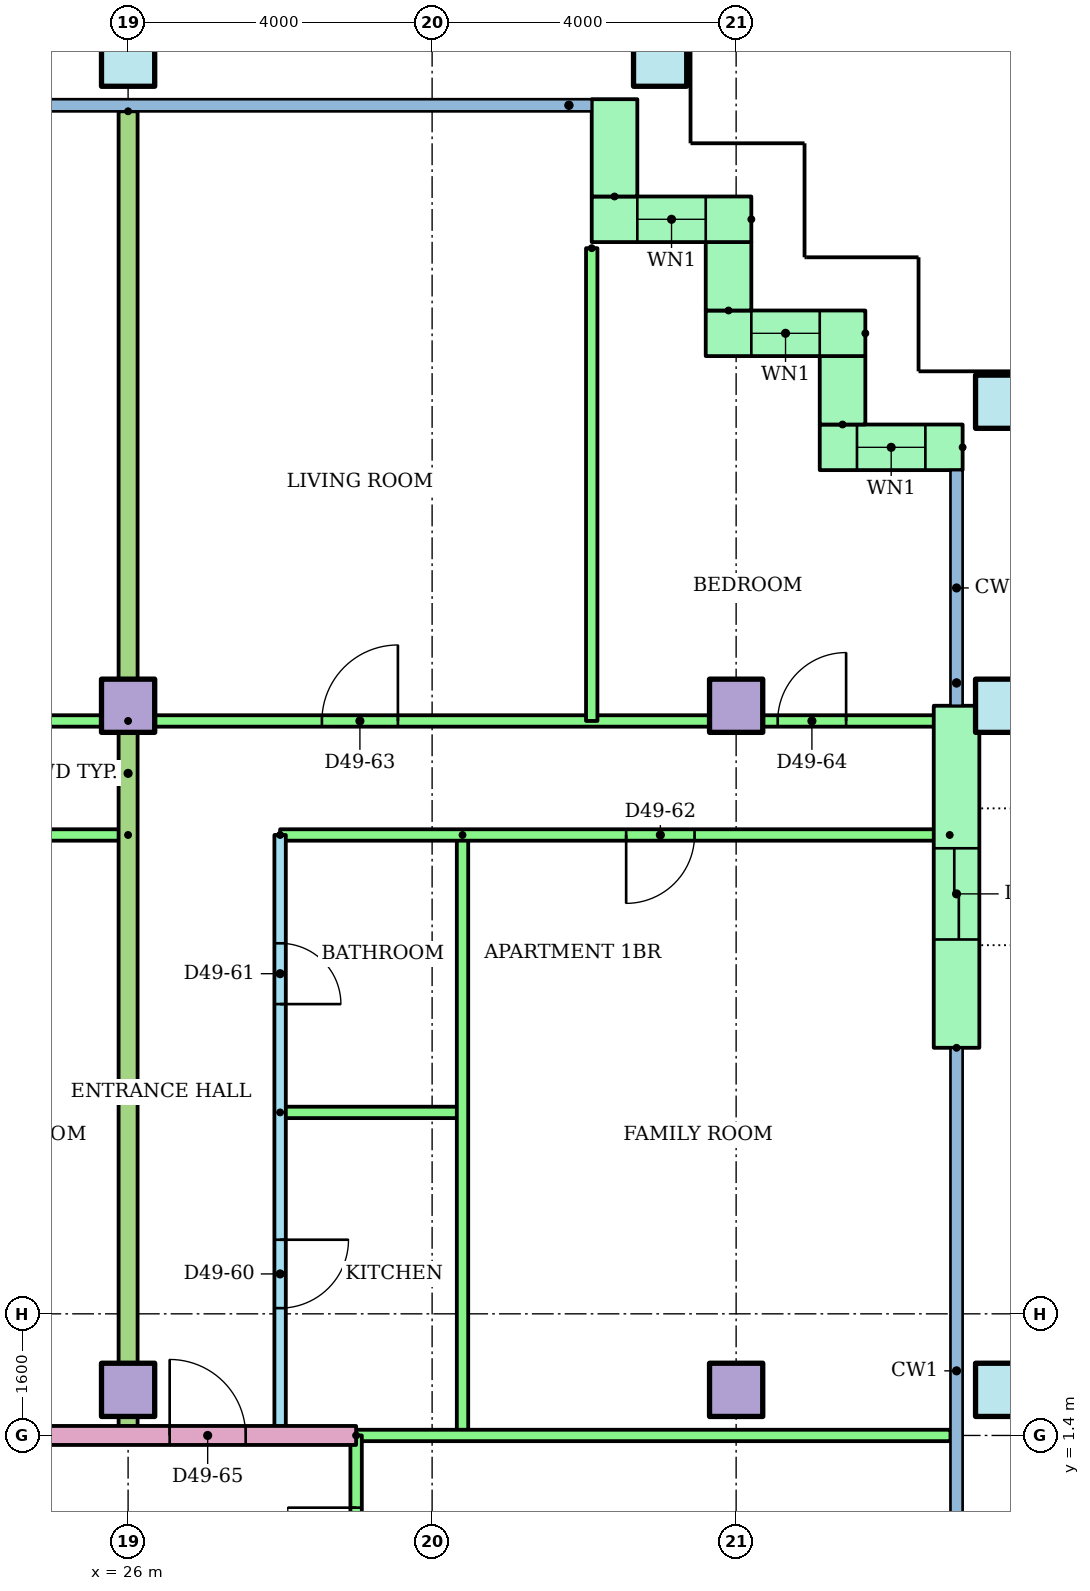
"""IFC4 building model, lengths in metres.
Left out: names, types, materials, properties, quantities, classifications, styles, units other than length and angle.
Written with IfcOpenShell. Run it as: python <this file> out.ifc"""

import sys

from ifc_helpers import new_model, si_unit, direction, frame, frame_2d, origin, origin_2d, place, context, subcontext, project, spatial, rectangle, hollow_rectangle, extrude, element, fill, save


model = new_model("IFC4")
c1 = context("Model", 3, precision=1e-05, world=origin(), true_north=direction((0.0, 1.0)))
c2 = subcontext(c1, "Body", "Model", "MODEL_VIEW")
j1 = project(units=[si_unit("LENGTHUNIT", "METRE"), si_unit("PLANEANGLEUNIT", "RADIAN")], contexts=[c1])
p1 = place(None, origin())
s1 = spatial("IfcSite", under=j1, at=p1, CompositionType="ELEMENT")
p2 = place(p1, origin())
s2 = spatial("IfcBuilding", under=s1, at=p2, CompositionType="ELEMENT")
p3 = place(p2, frame((0.0, 0.0, 187.7)))
s3 = spatial("IfcBuildingStorey", under=s2, at=p3, CompositionType="ELEMENT", Elevation=187.7)
for number, where in (
    (1, (26.0, 2.0, 0.0)),
    (2, (34.0, 2.0, 0.0)),
):
    element("IfcColumn", number, at=place(p3, frame(where)), inside=s3, PredefinedType="COLUMN", context=c2, shape_type="SweptSolid", body=[
        extrude(rectangle(XDim=0.7, YDim=0.7, at=origin_2d()), origin(), (0.0, 0.0, 1.0), 3.2),
    ])
p4 = place(p3, frame((37.5, 2.0, 0.0)))
e3 = element("IfcColumn", 3, at=p4, inside=s3, PredefinedType="COLUMN", context=c2, shape_type="SweptSolid", body=[
    extrude(hollow_rectangle(XDim=0.7, YDim=0.7, WallThickness=0.036, at=origin_2d()), origin(), (0.0, 0.0, 1.0), 3.2),
])
for number, where in (
    (4, (26.0, 11.0, 0.0)),
    (5, (34.0, 11.0, 0.0)),
):
    element("IfcColumn", number, at=place(p3, frame(where)), inside=s3, PredefinedType="COLUMN", context=c2, shape_type="SweptSolid", body=[
        extrude(rectangle(XDim=0.7, YDim=0.7, at=origin_2d()), origin(), (0.0, 0.0, 1.0), 3.2),
    ])
for number, where in (
    (6, (37.5, 11.0, 0.0)),
    (7, (37.5, 15.0, 0.0)),
    (8, (26.0, 19.5, 0.0)),
    (9, (33.0, 19.5, 0.0)),
):
    element("IfcColumn", number, at=place(p3, frame(where)), inside=s3, PredefinedType="COLUMN", context=c2, shape_type="SweptSolid", body=[
        extrude(hollow_rectangle(XDim=0.7, YDim=0.7, WallThickness=0.036, at=origin_2d()), origin(), (0.0, 0.0, 1.0), 3.2),
    ])
p5 = place(p3, frame((36.98, 14.4, 0.0), z_axis=(0.0, 0.0, 1.0), x_axis=(-1.0, 0.0, 0.0)))
e10 = element("IfcWall", 10, at=p5, inside=s3, PredefinedType="STANDARD", context=c2, shape_type="SweptSolid", body=[
    extrude(rectangle(XDim=1.88, YDim=0.6, at=frame_2d((0.94, 0.0))), origin(), (0.0, 0.0, 1.0), 2.92),
])
p6 = place(p5, frame((0.49, 0.0, 0.9)))
e11 = element("IfcOpeningElement", 11, at=p6, cuts=e10, PredefinedType="OPENING", context=c2, shape_type="SweptSolid", body=[
    extrude(rectangle(XDim=0.9, YDim=1.5, at=frame_2d((0.45, 0.75))), frame((0.0, 0.31, 0.0), z_axis=(0.0, -1.0, 0.0), x_axis=(1.0, 0.0, 0.0)), (0.0, 0.0, 1.0), 0.62),
])
p7 = place(p3, frame((35.4, 14.7, 0.0), z_axis=(0.0, 0.0, 1.0), x_axis=(0.0, 1.0, 0.0)))
e12 = element("IfcWall", 12, at=p7, inside=s3, PredefinedType="STANDARD", context=c2, shape_type="SweptSolid", body=[
    extrude(rectangle(XDim=0.9, YDim=0.6, at=frame_2d((0.45, 0.0))), origin(), (0.0, 0.0, 1.0), 2.92),
])
p8 = place(p3, frame((35.7, 15.9, 0.0), z_axis=(0.0, 0.0, 1.0), x_axis=(-1.0, 0.0, 0.0)))
e13 = element("IfcWall", 13, at=p8, inside=s3, PredefinedType="STANDARD", context=c2, shape_type="SweptSolid", body=[
    extrude(rectangle(XDim=2.1, YDim=0.6, at=frame_2d((1.05, 0.0))), origin(), (0.0, 0.0, 1.0), 2.92),
])
p9 = place(p8, frame((0.6, 0.0, 0.9)))
e14 = element("IfcOpeningElement", 14, at=p9, cuts=e13, PredefinedType="OPENING", context=c2, shape_type="SweptSolid", body=[
    extrude(rectangle(XDim=0.9, YDim=1.5, at=frame_2d((0.45, 0.75))), frame((0.0, 0.31, 0.0), z_axis=(0.0, -1.0, 0.0), x_axis=(1.0, 0.0, 0.0)), (0.0, 0.0, 1.0), 0.62),
])
p10 = place(p3, frame((33.9, 16.2, 0.0), z_axis=(0.0, 0.0, 1.0), x_axis=(0.0, 1.0, 0.0)))
e15 = element("IfcWall", 15, at=p10, inside=s3, PredefinedType="STANDARD", context=c2, shape_type="SweptSolid", body=[
    extrude(rectangle(XDim=0.9, YDim=0.6, at=frame_2d((0.45, 0.0))), origin(), (0.0, 0.0, 1.0), 2.92),
])
p11 = place(p3, frame((34.2, 17.4, 0.0), z_axis=(0.0, 0.0, 1.0), x_axis=(-1.0, 0.0, 0.0)))
e16 = element("IfcWall", 16, at=p11, inside=s3, PredefinedType="STANDARD", context=c2, shape_type="SweptSolid", body=[
    extrude(rectangle(XDim=2.1, YDim=0.6, at=frame_2d((1.05, 0.0))), origin(), (0.0, 0.0, 1.0), 2.92),
])
p12 = place(p11, frame((0.6, 0.0, 0.9)))
e17 = element("IfcOpeningElement", 17, at=p12, cuts=e16, PredefinedType="OPENING", context=c2, shape_type="SweptSolid", body=[
    extrude(rectangle(XDim=0.9, YDim=1.5, at=frame_2d((0.45, 0.75))), frame((0.0, 0.31, 0.0), z_axis=(0.0, -1.0, 0.0), x_axis=(1.0, 0.0, 0.0)), (0.0, 0.0, 1.0), 0.62),
])
p13 = place(p3, frame((32.4, 17.7, 0.0), z_axis=(0.0, 0.0, 1.0), x_axis=(0.0, 1.0, 0.0)))
e18 = element("IfcWall", 18, at=p13, inside=s3, PredefinedType="STANDARD", context=c2, shape_type="SweptSolid", body=[
    extrude(rectangle(XDim=1.28, YDim=0.6, at=frame_2d((0.64, 0.0))), origin(), (0.0, 0.0, 1.0), 2.92),
])
p14 = place(p3, frame((36.9, 6.5, 0.0), z_axis=(0.0, 0.0, 1.0), x_axis=(0.0, 1.0, 0.0)))
e19 = element("IfcWall", 19, at=p14, inside=s3, PredefinedType="STANDARD", context=c2, shape_type="SweptSolid", body=[
    extrude(rectangle(XDim=4.5, YDim=0.6, at=frame_2d((2.25, 0.0))), origin(), (0.0, 0.0, 1.0), 2.92),
])
p15 = place(p14, frame((1.425, 0.0, 0.0)))
e20 = element("IfcOpeningElement", 20, at=p15, cuts=e19, PredefinedType="OPENING", context=c2, shape_type="SweptSolid", body=[
    extrude(rectangle(XDim=1.2, YDim=2.1, at=frame_2d((0.6, 1.05))), frame((0.0, 0.31, 0.0), z_axis=(0.0, -1.0, 0.0), x_axis=(1.0, 0.0, 0.0)), (0.0, 0.0, 1.0), 0.62),
])
p16 = place(p3, frame((26.0, 9.3, 0.0), z_axis=(0.0, 0.0, 1.0), x_axis=(-1.0, 0.0, 0.0)))
e21 = element("IfcWall", 21, at=p16, inside=s3, PredefinedType="PARTITIONING", context=c2, shape_type="SweptSolid", body=[
    extrude(rectangle(XDim=10.0, YDim=0.15, at=frame_2d((5.0, 0.0))), origin(), (0.0, 0.0, 1.0), 2.4),
])
p17 = place(p16, frame((4.9, 0.0, 0.0)))
e22 = element("IfcOpeningElement", 22, at=p17, cuts=e21, PredefinedType="OPENING", context=c2, shape_type="SweptSolid", body=[
    extrude(rectangle(XDim=0.9, YDim=2.1, at=frame_2d((0.45, 1.05))), frame((0.0, 0.085, 0.0), z_axis=(0.0, -1.0, 0.0), x_axis=(1.0, 0.0, 0.0)), (0.0, 0.0, 1.0), 0.17),
])
p18 = place(p16, frame((1.1, 0.0, 0.0)))
e23 = element("IfcOpeningElement", 23, at=p18, cuts=e21, PredefinedType="OPENING", context=c2, shape_type="SweptSolid", body=[
    extrude(rectangle(XDim=0.9, YDim=2.1, at=frame_2d((0.45, 1.05))), frame((0.0, 0.085, 0.0), z_axis=(0.0, -1.0, 0.0), x_axis=(1.0, 0.0, 0.0)), (0.0, 0.0, 1.0), 0.17),
])
p19 = place(p3, frame((14.0, 10.8, 0.0)))
e24 = element("IfcWall", 24, at=p19, inside=s3, PredefinedType="PARTITIONING", context=c2, shape_type="SweptSolid", body=[
    extrude(rectangle(XDim=12.0, YDim=0.15, at=frame_2d((6.0, 0.0))), origin(), (0.0, 0.0, 1.0), 2.4),
])
p20 = place(p19, frame((1.5, 0.0, 0.0)))
e25 = element("IfcOpeningElement", 25, at=p20, cuts=e24, PredefinedType="OPENING", context=c2, shape_type="SweptSolid", body=[
    extrude(rectangle(XDim=1.0, YDim=2.1, at=frame_2d((0.5, 1.05))), frame((0.0, 0.085, 0.0), z_axis=(0.0, -1.0, 0.0), x_axis=(1.0, 0.0, 0.0)), (0.0, 0.0, 1.0), 0.17),
])
p21 = place(p19, frame((7.55, 0.0, 0.0)))
e26 = element("IfcOpeningElement", 26, at=p21, cuts=e24, PredefinedType="OPENING", context=c2, shape_type="SweptSolid", body=[
    extrude(rectangle(XDim=0.9, YDim=2.1, at=frame_2d((0.45, 1.05))), frame((0.0, 0.085, 0.0), z_axis=(0.0, -1.0, 0.0), x_axis=(1.0, 0.0, 0.0)), (0.0, 0.0, 1.0), 0.17),
])
p22 = place(p3, frame((28.0, 9.3, 0.0), z_axis=(0.0, 0.0, 1.0), x_axis=(0.0, -1.0, 0.0)))
e27 = element("IfcWall", 27, at=p22, inside=s3, PredefinedType="PARTITIONING", context=c2, shape_type="SweptSolid", body=[
    extrude(rectangle(XDim=7.9, YDim=0.15, at=frame_2d((3.95, 0.0))), origin(), (0.0, 0.0, 1.0), 2.4),
])
p23 = place(p22, frame((5.325, 0.0, 0.0)))
e28 = element("IfcOpeningElement", 28, at=p23, cuts=e27, PredefinedType="OPENING", context=c2, shape_type="SweptSolid", body=[
    extrude(rectangle(XDim=0.9, YDim=2.1, at=frame_2d((0.45, 1.05))), frame((0.0, 0.085, 0.0), z_axis=(0.0, -1.0, 0.0), x_axis=(1.0, 0.0, 0.0)), (0.0, 0.0, 1.0), 0.17),
])
p24 = place(p22, frame((1.425, 0.0, 0.0)))
e29 = element("IfcOpeningElement", 29, at=p24, cuts=e27, PredefinedType="OPENING", context=c2, shape_type="SweptSolid", body=[
    extrude(rectangle(XDim=0.8, YDim=2.1, at=frame_2d((0.4, 1.05))), frame((0.0, 0.085, 0.0), z_axis=(0.0, -1.0, 0.0), x_axis=(1.0, 0.0, 0.0)), (0.0, 0.0, 1.0), 0.17),
])
p25 = place(p3, frame((28.0, 5.65, 0.0)))
e30 = element("IfcWall", 30, at=p25, inside=s3, PredefinedType="PARTITIONING", context=c2, shape_type="SweptSolid", body=[
    extrude(rectangle(XDim=2.4, YDim=0.15, at=frame_2d((1.2, 0.0))), origin(), (0.0, 0.0, 1.0), 2.4),
])
p26 = place(p3, frame((30.4, 9.3, 0.0), z_axis=(0.0, 0.0, 1.0), x_axis=(0.0, -1.0, 0.0)))
e31 = element("IfcWall", 31, at=p26, inside=s3, PredefinedType="PARTITIONING", context=c2, shape_type="SweptSolid", body=[
    extrude(rectangle(XDim=7.9, YDim=0.15, at=frame_2d((3.95, 0.0))), origin(), (0.0, 0.0, 1.0), 2.4),
])
p27 = place(p3, frame((36.81, 9.3, 0.0), z_axis=(0.0, 0.0, 1.0), x_axis=(-1.0, 0.0, 0.0)))
e32 = element("IfcWall", 32, at=p27, inside=s3, PredefinedType="PARTITIONING", context=c2, shape_type="SweptSolid", body=[
    extrude(rectangle(XDim=8.81, YDim=0.15, at=frame_2d((4.405, 0.0))), origin(), (0.0, 0.0, 1.0), 2.4),
])
p28 = place(p27, frame((3.357, 0.0, 0.0)))
e33 = element("IfcOpeningElement", 33, at=p28, cuts=e32, PredefinedType="OPENING", context=c2, shape_type="SweptSolid", body=[
    extrude(rectangle(XDim=0.9, YDim=2.1, at=frame_2d((0.45, 1.05))), frame((0.0, 0.085, 0.0), z_axis=(0.0, -1.0, 0.0), x_axis=(1.0, 0.0, 0.0)), (0.0, 0.0, 1.0), 0.17),
])
p29 = place(p3, frame((26.0, 10.8, 0.0)))
e34 = element("IfcWall", 34, at=p29, inside=s3, PredefinedType="PARTITIONING", context=c2, shape_type="SweptSolid", body=[
    extrude(rectangle(XDim=10.81, YDim=0.15, at=frame_2d((5.405, 0.0))), origin(), (0.0, 0.0, 1.0), 2.4),
])
p30 = place(p29, frame((2.55, 0.0, 0.0)))
e35 = element("IfcOpeningElement", 35, at=p30, cuts=e34, PredefinedType="OPENING", context=c2, shape_type="SweptSolid", body=[
    extrude(rectangle(XDim=1.0, YDim=2.1, at=frame_2d((0.5, 1.05))), frame((0.0, 0.085, 0.0), z_axis=(0.0, -1.0, 0.0), x_axis=(1.0, 0.0, 0.0)), (0.0, 0.0, 1.0), 0.17),
])
p31 = place(p29, frame((8.547, 0.0, 0.0)))
e36 = element("IfcOpeningElement", 36, at=p31, cuts=e34, PredefinedType="OPENING", context=c2, shape_type="SweptSolid", body=[
    extrude(rectangle(XDim=0.9, YDim=2.1, at=frame_2d((0.45, 1.05))), frame((0.0, 0.085, 0.0), z_axis=(0.0, -1.0, 0.0), x_axis=(1.0, 0.0, 0.0)), (0.0, 0.0, 1.0), 0.17),
])
p32 = place(p3, frame((32.1, 17.02, 0.0), z_axis=(0.0, 0.0, 1.0), x_axis=(0.0, -1.0, 0.0)))
e37 = element("IfcWall", 37, at=p32, inside=s3, PredefinedType="PARTITIONING", context=c2, shape_type="SweptSolid", body=[
    extrude(rectangle(XDim=6.22, YDim=0.15, at=frame_2d((3.11, 0.0))), origin(), (0.0, 0.0, 1.0), 2.4),
])
p33 = place(p3, frame((26.0, 18.821, 0.0), z_axis=(0.0, 0.0, 1.0), x_axis=(0.0, -1.0, 0.0)))
e38 = element("IfcWall", 38, at=p33, inside=s3, PredefinedType="PARTITIONING", context=c2, shape_type="SweptSolid", body=[
    extrude(rectangle(XDim=17.421, YDim=0.25, at=frame_2d((8.71, 0.0))), origin(), (0.0, 0.0, 1.0), 2.4),
])
p34 = place(p3, frame((14.0, 1.4, 0.0)))
e39 = element("IfcWall", 39, at=p34, inside=s3, PredefinedType="PARTITIONING", context=c2, shape_type="SweptSolid", body=[
    extrude(rectangle(XDim=15.0, YDim=0.25, at=frame_2d((7.5, 0.0))), origin(), (0.0, 0.0, 1.0), 2.4),
])
p35 = place(p34, frame((0.5, 0.0, 0.0)))
e40 = element("IfcOpeningElement", 40, at=p35, cuts=e39, PredefinedType="OPENING", context=c2, shape_type="SweptSolid", body=[
    extrude(rectangle(XDim=1.0, YDim=2.1, at=frame_2d((0.5, 1.05))), frame((0.0, 0.135, 0.0), z_axis=(0.0, -1.0, 0.0), x_axis=(1.0, 0.0, 0.0)), (0.0, 0.0, 1.0), 0.27),
])
p36 = place(p34, frame((12.547, 0.0, 0.0)))
e41 = element("IfcOpeningElement", 41, at=p36, cuts=e39, PredefinedType="OPENING", context=c2, shape_type="SweptSolid", body=[
    extrude(rectangle(XDim=1.0, YDim=2.1, at=frame_2d((0.5, 1.05))), frame((0.0, 0.135, 0.0), z_axis=(0.0, -1.0, 0.0), x_axis=(1.0, 0.0, 0.0)), (0.0, 0.0, 1.0), 0.27),
])
p37 = place(p3, frame((29.0, 1.4, 0.0)))
e42 = element("IfcWall", 42, at=p37, inside=s3, PredefinedType="PARTITIONING", context=c2, shape_type="SweptSolid", body=[
    extrude(rectangle(XDim=7.82, YDim=0.15, at=frame_2d((3.91, 0.0))), origin(), (0.0, 0.0, 1.0), 2.4),
])
p38 = place(p3, frame((29.0, -1.4, 0.0), z_axis=(0.0, 0.0, 1.0), x_axis=(0.0, 1.0, 0.0)))
e43 = element("IfcWall", 43, at=p38, inside=s3, PredefinedType="PARTITIONING", context=c2, shape_type="SweptSolid", body=[
    extrude(rectangle(XDim=2.8, YDim=0.15, at=frame_2d((1.4, 0.0))), origin(), (0.0, 0.0, 1.0), 2.4),
])
p39 = place(p38, frame((0.95, 0.0, 0.0)))
e44 = element("IfcOpeningElement", 44, at=p39, cuts=e43, PredefinedType="OPENING", context=c2, shape_type="SweptSolid", body=[
    extrude(rectangle(XDim=0.9, YDim=2.1, at=frame_2d((0.45, 1.05))), frame((0.0, 0.085, 0.0), z_axis=(0.0, -1.0, 0.0), x_axis=(1.0, 0.0, 0.0)), (0.0, 0.0, 1.0), 0.17),
])
p40 = place(p6, origin())
e45 = element("IfcWindow", 45, at=p40, inside=s3, PartitioningType="SINGLE_PANEL", PredefinedType="WINDOW", context=c2, shape_type="SweptSolid", body=[
    extrude(rectangle(XDim=0.9, YDim=1.5, at=frame_2d((0.45, 0.75))), frame((0.0, 0.03, 0.0), z_axis=(0.0, -1.0, 0.0), x_axis=(1.0, 0.0, 0.0)), (0.0, 0.0, 1.0), 0.06),
])
fill(e11, e45)
p41 = place(p9, origin())
e46 = element("IfcWindow", 46, at=p41, inside=s3, PartitioningType="SINGLE_PANEL", PredefinedType="WINDOW", context=c2, shape_type="SweptSolid", body=[
    extrude(rectangle(XDim=0.9, YDim=1.5, at=frame_2d((0.45, 0.75))), frame((0.0, 0.03, 0.0), z_axis=(0.0, -1.0, 0.0), x_axis=(1.0, 0.0, 0.0)), (0.0, 0.0, 1.0), 0.06),
])
fill(e14, e46)
p42 = place(p12, origin())
e47 = element("IfcWindow", 47, at=p42, inside=s3, PartitioningType="SINGLE_PANEL", PredefinedType="WINDOW", context=c2, shape_type="SweptSolid", body=[
    extrude(rectangle(XDim=0.9, YDim=1.5, at=frame_2d((0.45, 0.75))), frame((0.0, 0.03, 0.0), z_axis=(0.0, -1.0, 0.0), x_axis=(1.0, 0.0, 0.0)), (0.0, 0.0, 1.0), 0.06),
])
fill(e17, e47)
p43 = place(p23, origin())
e48 = element("IfcDoor", 48, at=p43, inside=s3, OperationType="SINGLE_SWING_LEFT", PredefinedType="DOOR", context=c2, shape_type="SweptSolid", body=[
    extrude(rectangle(XDim=0.9, YDim=2.1, at=frame_2d((0.45, 1.05))), frame((0.0, 0.025, 0.0), z_axis=(0.0, -1.0, 0.0), x_axis=(1.0, 0.0, 0.0)), (0.0, 0.0, 1.0), 0.05),
])
fill(e28, e48)
p44 = place(p24, origin())
e49 = element("IfcDoor", 49, at=p44, inside=s3, OperationType="SINGLE_SWING_RIGHT", PredefinedType="DOOR", context=c2, shape_type="SweptSolid", body=[
    extrude(rectangle(XDim=0.8, YDim=2.1, at=frame_2d((0.4, 1.05))), frame((0.0, 0.025, 0.0), z_axis=(0.0, -1.0, 0.0), x_axis=(1.0, 0.0, 0.0)), (0.0, 0.0, 1.0), 0.05),
])
fill(e29, e49)
p45 = place(p28, origin())
e50 = element("IfcDoor", 50, at=p45, inside=s3, OperationType="SINGLE_SWING_RIGHT", PredefinedType="DOOR", context=c2, shape_type="SweptSolid", body=[
    extrude(rectangle(XDim=0.9, YDim=2.1, at=frame_2d((0.45, 1.05))), frame((0.0, 0.025, 0.0), z_axis=(0.0, -1.0, 0.0), x_axis=(1.0, 0.0, 0.0)), (0.0, 0.0, 1.0), 0.05),
])
fill(e33, e50)
p46 = place(p30, origin())
e51 = element("IfcDoor", 51, at=p46, inside=s3, OperationType="SINGLE_SWING_RIGHT", PredefinedType="DOOR", context=c2, shape_type="SweptSolid", body=[
    extrude(rectangle(XDim=1.0, YDim=2.1, at=frame_2d((0.5, 1.05))), frame((0.0, 0.025, 0.0), z_axis=(0.0, -1.0, 0.0), x_axis=(1.0, 0.0, 0.0)), (0.0, 0.0, 1.0), 0.05),
])
fill(e35, e51)
p47 = place(p31, origin())
e52 = element("IfcDoor", 52, at=p47, inside=s3, OperationType="SINGLE_SWING_RIGHT", PredefinedType="DOOR", context=c2, shape_type="SweptSolid", body=[
    extrude(rectangle(XDim=0.9, YDim=2.1, at=frame_2d((0.45, 1.05))), frame((0.0, 0.025, 0.0), z_axis=(0.0, -1.0, 0.0), x_axis=(1.0, 0.0, 0.0)), (0.0, 0.0, 1.0), 0.05),
])
fill(e36, e52)
p48 = place(p36, origin())
e53 = element("IfcDoor", 53, at=p48, inside=s3, OperationType="SINGLE_SWING_LEFT", PredefinedType="DOOR", context=c2, shape_type="SweptSolid", body=[
    extrude(rectangle(XDim=1.0, YDim=2.1, at=frame_2d((0.5, 1.05))), frame((0.0, 0.025, 0.0), z_axis=(0.0, -1.0, 0.0), x_axis=(1.0, 0.0, 0.0)), (0.0, 0.0, 1.0), 0.05),
])
fill(e41, e53)
p49 = place(p39, origin())
e54 = element("IfcDoor", 54, at=p49, inside=s3, OperationType="SINGLE_SWING_RIGHT", PredefinedType="DOOR", context=c2, shape_type="SweptSolid", body=[
    extrude(rectangle(XDim=0.9, YDim=2.1, at=frame_2d((0.45, 1.05))), frame((0.0, 0.025, 0.0), z_axis=(0.0, -1.0, 0.0), x_axis=(1.0, 0.0, 0.0)), (0.0, 0.0, 1.0), 0.05),
])
fill(e44, e54)
p50 = place(p15, origin())
e55 = element("IfcDoor", 55, at=p50, inside=s3, OperationType="SLIDING_TO_LEFT", PredefinedType="DOOR", context=c2, shape_type="SweptSolid", body=[
    extrude(rectangle(XDim=1.2, YDim=2.1, at=frame_2d((0.6, 1.05))), frame((0.0, 0.025, 0.0), z_axis=(0.0, -1.0, 0.0), x_axis=(1.0, 0.0, 0.0)), (0.0, 0.0, 1.0), 0.05),
])
fill(e20, e55)
save(model, sys.argv[1])
